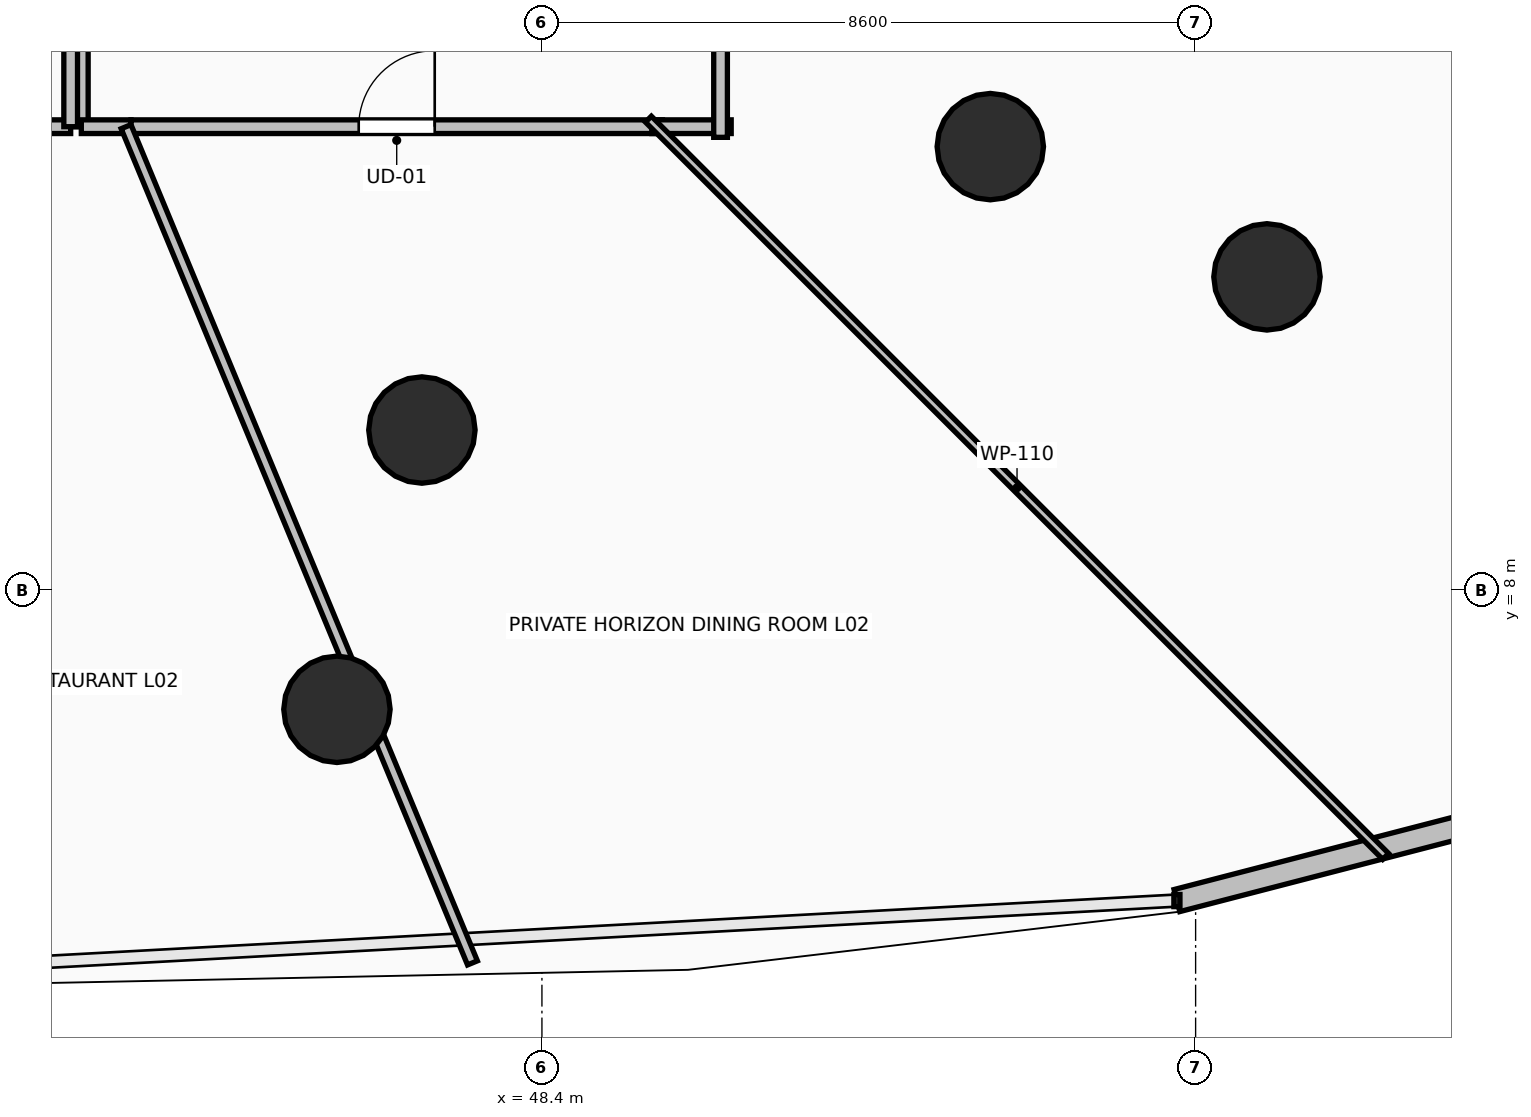
"""IFC4 building model, lengths in metres.
Left out: names, types, materials, properties, quantities, classifications, styles, units other than length and angle.
Written with IfcOpenShell. Run it as: python <this file> out.ifc"""

import sys

from ifc_helpers import new_model, si_unit, direction, frame, frame_2d, origin, origin_2d, place, context, subcontext, project, spatial, rectangle, circle, extrude, element, fill, save


model = new_model("IFC4")
c1 = context("Model", 3, precision=1e-05, world=origin(), true_north=direction((0.0, 1.0)))
c2 = subcontext(c1, "Body", "Model", "MODEL_VIEW")
j1 = project(units=[si_unit("LENGTHUNIT", "METRE"), si_unit("PLANEANGLEUNIT", "RADIAN")], contexts=[c1])
p1 = place(None, origin())
s1 = spatial("IfcSite", under=j1, at=p1, CompositionType="ELEMENT")
p2 = place(p1, origin())
s2 = spatial("IfcBuilding", under=s1, at=p2, CompositionType="ELEMENT")
p3 = place(p2, frame((0.0, 0.0, 9.6)))
s3 = spatial("IfcBuildingStorey", under=s2, at=p3, CompositionType="ELEMENT", Elevation=9.6)
for number, where, z_axis, x_axis in (
    (1, (46.821, 10.109, 0.0), (0.0, 0.0, 1.0), (0.383, -0.924, 0.0)),
    (2, (54.299, 13.838, 0.0), (0.0, 0.0, 1.0), (0.707, -0.707, 0.0)),
    (3, (45.703, 6.435, 0.0), (0.0, 0.0, 1.0), (0.383, -0.924, 0.0)),
    (4, (57.939, 12.124, 0.0), (0.0, 0.0, 1.0), (0.707, -0.707, 0.0)),
):
    element("IfcColumn", number, at=place(p3, frame(where, z_axis=z_axis, x_axis=x_axis)), inside=s3, PredefinedType="COLUMN", context=c2, shape_type="SweptSolid", body=[
        extrude(circle(Radius=0.7, at=origin_2d()), origin(), (0.0, 0.0, 1.0), 4.8),
    ])
p4 = place(p3, frame((56.754, 3.919, 0.0), z_axis=(0.0, 0.0, 1.0), x_axis=(0.968005762902, 0.250927963744, 0.0)))
e5 = element("IfcWall", 5, at=p4, inside=s3, PredefinedType="STANDARD", context=c2, shape_type="SweptSolid", body=[
    extrude(rectangle(XDim=5.203, YDim=0.3, at=frame_2d((2.602, 0.0))), origin(), (0.0, 0.0, 1.0), 4.48),
])
p5 = place(p3, frame((42.34, 15.679, 0.0), z_axis=(0.0, 0.0, 1.0), x_axis=(0.0, -1.0, 0.0)))
e6 = element("IfcWall", 6, at=p5, inside=s3, PredefinedType="PARTITIONING", context=c2, shape_type="SweptSolid", body=[
    extrude(rectangle(XDim=1.579, YDim=0.18, at=frame_2d((0.79, 0.0))), origin(), (0.0, 0.0, 1.0), 4.48),
])
p6 = place(p3, frame((42.34, 14.1, 0.0), z_axis=(0.0, 0.0, 1.0), x_axis=(1.0, 0.0, 0.0)))
e7 = element("IfcWall", 7, at=p6, inside=s3, PredefinedType="PARTITIONING", context=c2, shape_type="SweptSolid", body=[
    extrude(rectangle(XDim=0.654, YDim=0.18, at=frame_2d((0.327, 0.0))), origin(), (0.0, 0.0, 1.0), 4.48),
])
p7 = place(p3, frame((38.06, 14.1, 0.0), z_axis=(0.0, 0.0, 1.0), x_axis=(1.0, 0.0, 0.0)))
e8 = element("IfcWall", 8, at=p7, inside=s3, PredefinedType="PARTITIONING", context=c2, shape_type="SweptSolid", body=[
    extrude(rectangle(XDim=4.14, YDim=0.18, at=frame_2d((2.07, 0.0))), origin(), (0.0, 0.0, 1.0), 4.48),
])
p8 = place(p7, frame((1.57, 0.0, 0.0)))
e9 = element("IfcOpeningElement", 9, at=p8, cuts=e8, PredefinedType="OPENING", context=c2, shape_type="SweptSolid", body=[
    extrude(rectangle(XDim=1.0, YDim=2.15, at=frame_2d((0.5, 1.075))), frame((0.0, 0.105, 0.0), z_axis=(0.0, -1.0, 0.0), x_axis=(1.0, 0.0, 0.0)), (0.0, 0.0, 1.0), 0.21),
])
p9 = place(p3, frame((42.2, 14.1, 0.0), z_axis=(0.0, 0.0, 1.0), x_axis=(0.0, 1.0, 0.0)))
e10 = element("IfcWall", 10, at=p9, inside=s3, PredefinedType="PARTITIONING", context=c2, shape_type="SweptSolid", body=[
    extrude(rectangle(XDim=1.82, YDim=0.18, at=frame_2d((0.91, 0.0))), origin(), (0.0, 0.0, 1.0), 4.48),
])
p10 = place(p3, frame((42.994, 14.1, 0.0), z_axis=(0.0, 0.0, 1.0), x_axis=(1.0, 0.0, 0.0)))
e11 = element("IfcWall", 11, at=p10, inside=s3, PredefinedType="PARTITIONING", context=c2, shape_type="SweptSolid", body=[
    extrude(rectangle(XDim=6.991, YDim=0.18, at=frame_2d((3.496, 0.0))), origin(), (0.0, 0.0, 1.0), 3.672),
])
p11 = place(p10, frame((2.996, 0.0, 0.0)))
e12 = element("IfcOpeningElement", 12, at=p11, cuts=e11, PredefinedType="OPENING", context=c2, shape_type="SweptSolid", body=[
    extrude(rectangle(XDim=1.0, YDim=2.15, at=frame_2d((0.5, 1.075))), frame((0.0, 0.105, 0.0), z_axis=(0.0, -1.0, 0.0), x_axis=(1.0, 0.0, 0.0)), (0.0, 0.0, 1.0), 0.21),
])
p12 = place(p3, frame((49.845, 14.1, 0.0), z_axis=(0.0, 0.0, 1.0), x_axis=(1.0, 0.0, 0.0)))
e13 = element("IfcWall", 13, at=p12, inside=s3, PredefinedType="PARTITIONING", context=c2, shape_type="SweptSolid", body=[
    extrude(rectangle(XDim=1.045, YDim=0.18, at=frame_2d((0.522, 0.0))), origin(), (0.0, 0.0, 1.0), 4.169),
])
p13 = place(p3, frame((50.75, 13.96, 0.0), z_axis=(0.0, 0.0, 1.0), x_axis=(0.0, 1.0, 0.0)))
e14 = element("IfcWall", 14, at=p13, inside=s3, PredefinedType="PARTITIONING", context=c2, shape_type="SweptSolid", body=[
    extrude(rectangle(XDim=12.24, YDim=0.18, at=frame_2d((6.12, 0.0))), origin(), (0.0, 0.0, 1.0), 3.672),
])
p14 = place(p13, frame((5.62, 0.0, 0.0)))
e15 = element("IfcOpeningElement", 15, at=p14, cuts=e14, PredefinedType="OPENING", context=c2, shape_type="SweptSolid", body=[
    extrude(rectangle(XDim=1.0, YDim=2.15, at=frame_2d((0.5, 1.075))), frame((0.0, 0.105, 0.0), z_axis=(0.0, -1.0, 0.0), x_axis=(1.0, 0.0, 0.0)), (0.0, 0.0, 1.0), 0.21),
])
p15 = place(p3, frame((47.486, 3.099, 0.0), z_axis=(0.0, 0.0, 1.0), x_axis=(-0.38271032831, 0.923868391388, 0.0)))
e16 = element("IfcWall", 16, at=p15, inside=s3, PredefinedType="PARTITIONING", context=c2, shape_type="SweptSolid", body=[
    extrude(rectangle(XDim=11.907, YDim=0.14, at=frame_2d((5.954, 0.0))), origin(), (0.0, 0.0, 1.0), 3.672),
])
p16 = place(p3, frame((59.5, 4.5, 0.0), z_axis=(0.0, 0.0, 1.0), x_axis=(-0.707106781187, 0.707106781187, 0.0)))
e17 = element("IfcWall", 17, at=p16, inside=s3, PredefinedType="PARTITIONING", context=c2, shape_type="SweptSolid", body=[
    extrude(rectangle(XDim=13.716, YDim=0.11, at=frame_2d((6.858, 0.0))), origin(), (0.0, 0.0, 1.0), 3.769),
])
p17 = place(p11, origin())
e18 = element("IfcDoor", 18, at=p17, inside=s3, OperationType="SINGLE_SWING_RIGHT", PredefinedType="DOOR", context=c2, shape_type="SweptSolid", body=[
    extrude(rectangle(XDim=1.0, YDim=2.15, at=frame_2d((0.5, 1.075))), frame((0.0, 0.025, 0.0), z_axis=(0.0, -1.0, 0.0), x_axis=(1.0, 0.0, 0.0)), (0.0, 0.0, 1.0), 0.05),
])
fill(e12, e18)
save(model, sys.argv[1])
